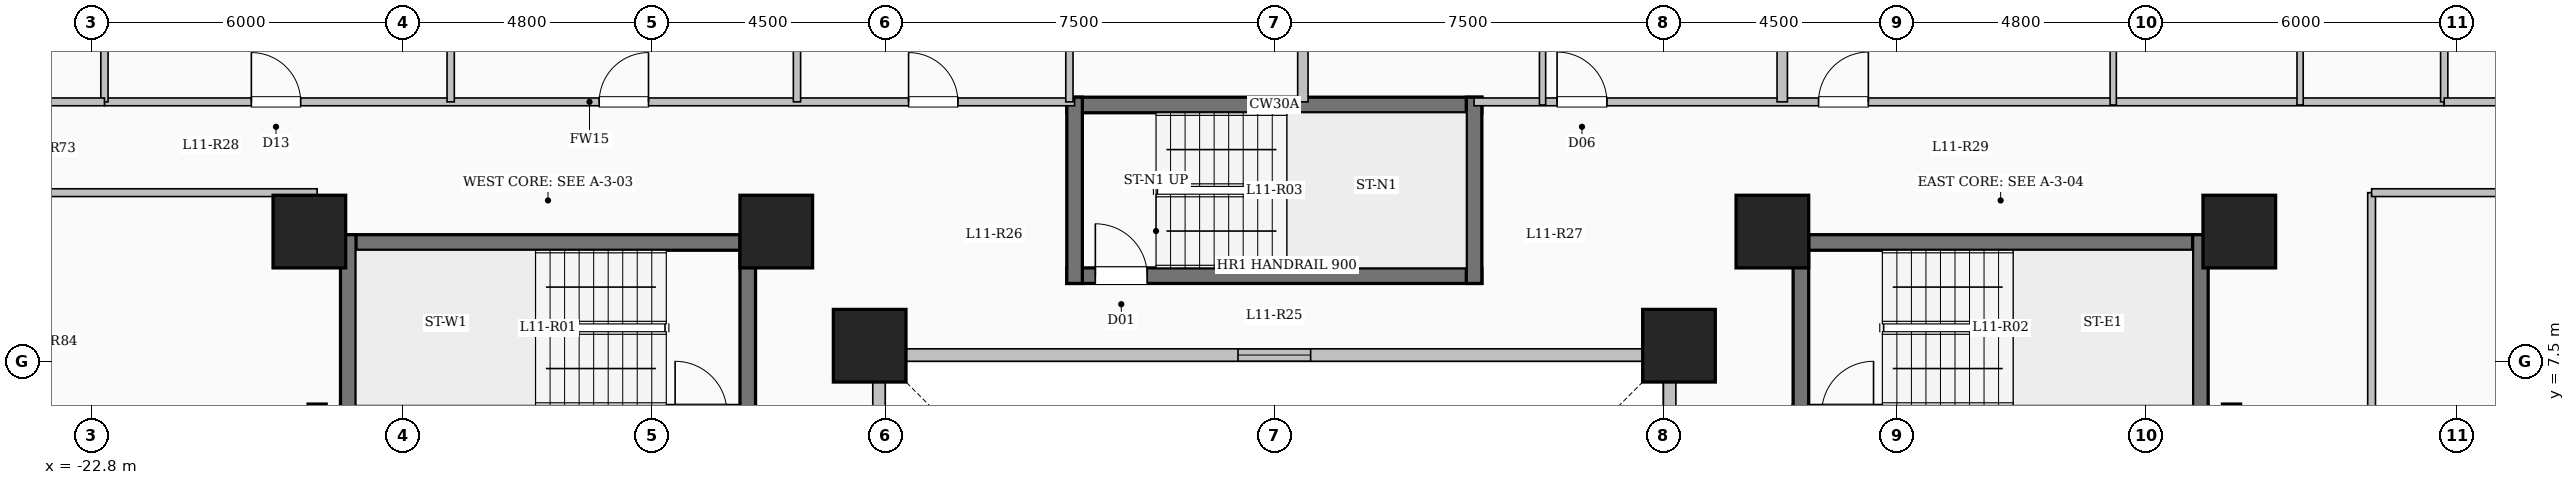
"""IFC4 building model, lengths in metres.
Left out: names, types, materials, properties, quantities, classifications, styles, units other than length and angle.
Written with IfcOpenShell. Run it as: python <this file> out.ifc"""

import sys

from ifc_helpers import new_model, si_unit, direction, frame, frame_2d, origin, origin_2d, place, context, subcontext, project, spatial, rectangle, extrude, element, fill, save


model = new_model("IFC4")
c1 = context("Model", 3, precision=1e-05, world=origin(), true_north=direction((0.0, 1.0)))
c2 = subcontext(c1, "Body", "Model", "MODEL_VIEW")
j1 = project(units=[si_unit("LENGTHUNIT", "METRE"), si_unit("PLANEANGLEUNIT", "RADIAN")], contexts=[c1])
p1 = place(None, origin())
s1 = spatial("IfcSite", under=j1, at=p1, CompositionType="ELEMENT")
p2 = place(p1, origin())
s2 = spatial("IfcBuilding", under=s1, at=p2, CompositionType="ELEMENT")
p3 = place(p2, frame((0.0, 0.0, 44.1)))
s3 = spatial("IfcBuildingStorey", under=s2, at=p3, CompositionType="ELEMENT", Elevation=44.1)
for number, where, z_axis, x_axis in (
    (1, (-7.8, 7.8, 0.0), (0.0, 0.0, 1.0), (1.0, 0.0, 0.0)),
    (2, (7.8, 7.8, 0.0), (0.0, 0.0, 1.0), (1.0, 0.0, 0.0)),
    (3, (-9.6, 10.0, 0.0), (0.0, 0.0, 1.0), (1.0, 0.0, 0.0)),
    (4, (9.6, 10.0, 0.0), (0.0, 0.0, 1.0), (1.0, 0.0, 0.0)),
    (5, (-18.6, 10.0, 0.0), (0.0, 0.0, 1.0), (1.0, 0.0, 0.0)),
    (6, (18.6, 10.0, 0.0), (0.0, 0.0, 1.0), (1.0, 0.0, 0.0)),
):
    element("IfcColumn", number, at=place(p3, frame(where, z_axis=z_axis, x_axis=x_axis)), inside=s3, PredefinedType="COLUMN", context=c2, shape_type="SweptSolid", body=[
        extrude(rectangle(XDim=1.4, YDim=1.4, at=origin_2d()), origin(), (0.0, 0.0, 1.0), 3.35),
    ])
p4 = place(p3, frame((7.62, -7.62, 0.0), z_axis=(0.0, 0.0, 1.0), x_axis=(0.0, 1.0, 0.0)))
e7 = element("IfcWall", 7, at=p4, inside=s3, PredefinedType="SOLIDWALL", context=c2, shape_type="SweptSolid", body=[
    extrude(rectangle(XDim=15.24, YDim=0.24, at=frame_2d((7.62, 0.0))), origin(), (0.0, 0.0, 1.0), 3.1),
])
p5 = place(p4, frame((6.92, 0.0, 0.95)))
e8 = element("IfcOpeningElement", 8, at=p5, cuts=e7, PredefinedType="OPENING", context=c2, shape_type="SweptSolid", body=[
    extrude(rectangle(XDim=1.4, YDim=1.5, at=frame_2d((0.7, 0.75))), frame((0.0, 0.13, 0.0), z_axis=(0.0, -1.0, 0.0), x_axis=(1.0, 0.0, 0.0)), (0.0, 0.0, 1.0), 0.26),
])
p6 = place(p3, frame((7.62, 7.62, 0.0), z_axis=(0.0, 0.0, 1.0), x_axis=(-1.0, 0.0, 0.0)))
e9 = element("IfcWall", 9, at=p6, inside=s3, PredefinedType="SOLIDWALL", context=c2, shape_type="SweptSolid", body=[
    extrude(rectangle(XDim=15.24, YDim=0.24, at=frame_2d((7.62, 0.0))), origin(), (0.0, 0.0, 1.0), 3.1),
])
p7 = place(p6, frame((6.92, 0.0, 0.95)))
e10 = element("IfcOpeningElement", 10, at=p7, cuts=e9, PredefinedType="OPENING", context=c2, shape_type="SweptSolid", body=[
    extrude(rectangle(XDim=1.4, YDim=1.5, at=frame_2d((0.7, 0.75))), frame((0.0, 0.13, 0.0), z_axis=(0.0, -1.0, 0.0), x_axis=(1.0, 0.0, 0.0)), (0.0, 0.0, 1.0), 0.26),
])
p8 = place(p3, frame((-7.62, 7.62, 0.0), z_axis=(0.0, 0.0, 1.0), x_axis=(0.0, -1.0, 0.0)))
e11 = element("IfcWall", 11, at=p8, inside=s3, PredefinedType="SOLIDWALL", context=c2, shape_type="SweptSolid", body=[
    extrude(rectangle(XDim=15.24, YDim=0.24, at=frame_2d((7.62, 0.0))), origin(), (0.0, 0.0, 1.0), 3.1),
])
p9 = place(p8, frame((6.92, 0.0, 0.95)))
e12 = element("IfcOpeningElement", 12, at=p9, cuts=e11, PredefinedType="OPENING", context=c2, shape_type="SweptSolid", body=[
    extrude(rectangle(XDim=1.4, YDim=1.5, at=frame_2d((0.7, 0.75))), frame((0.0, 0.13, 0.0), z_axis=(0.0, -1.0, 0.0), x_axis=(1.0, 0.0, 0.0)), (0.0, 0.0, 1.0), 0.26),
])
p10 = place(p3, frame((-18.0, 9.79, 0.0), z_axis=(0.0, 0.0, 1.0), x_axis=(1.0, 0.0, 0.0)))
e13 = element("IfcWall", 13, at=p10, inside=s3, PredefinedType="SHEAR", context=c2, shape_type="SweptSolid", body=[
    extrude(rectangle(XDim=8.0, YDim=0.3, at=frame_2d((4.0, 0.0))), origin(), (0.0, 0.0, 1.0), 3.35),
])
p11 = place(p3, frame((-18.0, 6.5, 0.0), z_axis=(0.0, 0.0, 1.0), x_axis=(1.0, 0.0, 0.0)))
e14 = element("IfcWall", 14, at=p11, inside=s3, PredefinedType="SHEAR", context=c2, shape_type="SweptSolid", body=[
    extrude(rectangle(XDim=8.0, YDim=0.3, at=frame_2d((4.0, 0.0))), origin(), (0.0, 0.0, 1.0), 3.35),
])
p12 = place(p11, frame((6.45, 0.0, 0.0)))
e15 = element("IfcOpeningElement", 15, at=p12, cuts=e14, PredefinedType="OPENING", context=c2, shape_type="SweptSolid", body=[
    extrude(rectangle(XDim=1.0, YDim=2.15, at=frame_2d((0.5, 1.075))), frame((0.0, 0.16, 0.0), z_axis=(0.0, -1.0, 0.0), x_axis=(1.0, 0.0, 0.0)), (0.0, 0.0, 1.0), 0.32),
])
for number, where, z_axis, x_axis in (
    (16, (-17.85, 6.35, 0.0), (0.0, 0.0, 1.0), (0.0, 1.0, 0.0)),
    (17, (-10.15, 6.35, 0.0), (0.0, 0.0, 1.0), (0.0, 1.0, 0.0)),
):
    element("IfcWall", number, at=place(p3, frame(where, z_axis=z_axis, x_axis=x_axis)), inside=s3, PredefinedType="SHEAR", context=c2, shape_type="SweptSolid", body=[
        extrude(rectangle(XDim=3.59, YDim=0.3, at=frame_2d((1.795, 0.0))), origin(), (0.0, 0.0, 1.0), 3.35),
    ])
p13 = place(p3, frame((10.0, 9.79, 0.0), z_axis=(0.0, 0.0, 1.0), x_axis=(1.0, 0.0, 0.0)))
e18 = element("IfcWall", 18, at=p13, inside=s3, PredefinedType="SHEAR", context=c2, shape_type="SweptSolid", body=[
    extrude(rectangle(XDim=8.0, YDim=0.3, at=frame_2d((4.0, 0.0))), origin(), (0.0, 0.0, 1.0), 3.35),
])
p14 = place(p3, frame((10.0, 6.5, 0.0), z_axis=(0.0, 0.0, 1.0), x_axis=(1.0, 0.0, 0.0)))
e19 = element("IfcWall", 19, at=p14, inside=s3, PredefinedType="SHEAR", context=c2, shape_type="SweptSolid", body=[
    extrude(rectangle(XDim=8.0, YDim=0.3, at=frame_2d((4.0, 0.0))), origin(), (0.0, 0.0, 1.0), 3.35),
])
p15 = place(p14, frame((0.55, 0.0, 0.0)))
e20 = element("IfcOpeningElement", 20, at=p15, cuts=e19, PredefinedType="OPENING", context=c2, shape_type="SweptSolid", body=[
    extrude(rectangle(XDim=1.0, YDim=2.15, at=frame_2d((0.5, 1.075))), frame((0.0, 0.16, 0.0), z_axis=(0.0, -1.0, 0.0), x_axis=(1.0, 0.0, 0.0)), (0.0, 0.0, 1.0), 0.32),
])
for number, where, z_axis, x_axis in (
    (21, (10.15, 6.35, 0.0), (0.0, 0.0, 1.0), (0.0, 1.0, 0.0)),
    (22, (17.85, 6.35, 0.0), (0.0, 0.0, 1.0), (0.0, 1.0, 0.0)),
):
    element("IfcWall", number, at=place(p3, frame(where, z_axis=z_axis, x_axis=x_axis)), inside=s3, PredefinedType="SHEAR", context=c2, shape_type="SweptSolid", body=[
        extrude(rectangle(XDim=3.59, YDim=0.3, at=frame_2d((1.795, 0.0))), origin(), (0.0, 0.0, 1.0), 3.35),
    ])
p16 = place(p3, frame((-4.0, 12.44, 0.0), z_axis=(0.0, 0.0, 1.0), x_axis=(1.0, 0.0, 0.0)))
e23 = element("IfcWall", 23, at=p16, inside=s3, PredefinedType="SHEAR", context=c2, shape_type="SweptSolid", body=[
    extrude(rectangle(XDim=8.0, YDim=0.3, at=frame_2d((4.0, 0.0))), origin(), (0.0, 0.0, 1.0), 3.35),
])
p17 = place(p3, frame((-4.0, 9.15, 0.0), z_axis=(0.0, 0.0, 1.0), x_axis=(1.0, 0.0, 0.0)))
e24 = element("IfcWall", 24, at=p17, inside=s3, PredefinedType="SHEAR", context=c2, shape_type="SweptSolid", body=[
    extrude(rectangle(XDim=8.0, YDim=0.3, at=frame_2d((4.0, 0.0))), origin(), (0.0, 0.0, 1.0), 3.35),
])
p18 = place(p17, frame((0.55, 0.0, 0.0)))
e25 = element("IfcOpeningElement", 25, at=p18, cuts=e24, PredefinedType="OPENING", context=c2, shape_type="SweptSolid", body=[
    extrude(rectangle(XDim=1.0, YDim=2.15, at=frame_2d((0.5, 1.075))), frame((0.0, 0.16, 0.0), z_axis=(0.0, -1.0, 0.0), x_axis=(1.0, 0.0, 0.0)), (0.0, 0.0, 1.0), 0.32),
])
for number, where, z_axis, x_axis in (
    (26, (-3.85, 9.0, 0.0), (0.0, 0.0, 1.0), (0.0, 1.0, 0.0)),
    (27, (3.85, 9.0, 0.0), (0.0, 0.0, 1.0), (0.0, 1.0, 0.0)),
):
    element("IfcWall", number, at=place(p3, frame(where, z_axis=z_axis, x_axis=x_axis)), inside=s3, PredefinedType="SHEAR", context=c2, shape_type="SweptSolid", body=[
        extrude(rectangle(XDim=3.59, YDim=0.3, at=frame_2d((1.795, 0.0))), origin(), (0.0, 0.0, 1.0), 3.35),
    ])
for number, where, z_axis, x_axis in (
    (28, (-18.45, -7.375, 0.0), (0.0, 0.0, 1.0), (0.0, 1.0, 0.0)),
    (29, (18.45, -7.375, 0.0), (0.0, 0.0, 1.0), (0.0, 1.0, 0.0)),
):
    element("IfcWall", number, at=place(p3, frame(where, z_axis=z_axis, x_axis=x_axis)), inside=s3, PredefinedType="SHEAR", context=c2, shape_type="SweptSolid", body=[
        extrude(rectangle(XDim=14.05, YDim=0.35, at=frame_2d((7.025, 0.0))), origin(), (0.0, 0.0, 1.0), 3.35),
    ])
p19 = place(p3, frame((-22.55, 12.5, 0.0), z_axis=(0.0, 0.0, 1.0), x_axis=(1.0, 0.0, 0.0)))
e30 = element("IfcWall", 30, at=p19, inside=s3, PredefinedType="PARTITIONING", context=c2, shape_type="SweptSolid", body=[
    extrude(rectangle(XDim=18.7, YDim=0.15, at=frame_2d((9.35, 0.0))), origin(), (0.0, 0.0, 1.0), 3.1),
])
p20 = place(p19, frame((2.832, 0.0, 0.0)))
e31 = element("IfcOpeningElement", 31, at=p20, cuts=e30, PredefinedType="OPENING", context=c2, shape_type="SweptSolid", body=[
    extrude(rectangle(XDim=0.95, YDim=2.15, at=frame_2d((0.475, 1.075))), frame((0.0, 0.085, 0.0), z_axis=(0.0, -1.0, 0.0), x_axis=(1.0, 0.0, 0.0)), (0.0, 0.0, 1.0), 0.17),
])
p21 = place(p19, frame((9.537, 0.0, 0.0)))
e32 = element("IfcOpeningElement", 32, at=p21, cuts=e30, PredefinedType="OPENING", context=c2, shape_type="SweptSolid", body=[
    extrude(rectangle(XDim=0.95, YDim=2.15, at=frame_2d((0.475, 1.075))), frame((0.0, 0.085, 0.0), z_axis=(0.0, -1.0, 0.0), x_axis=(1.0, 0.0, 0.0)), (0.0, 0.0, 1.0), 0.17),
])
p22 = place(p19, frame((15.5, 0.0, 0.0)))
e33 = element("IfcOpeningElement", 33, at=p22, cuts=e30, PredefinedType="OPENING", context=c2, shape_type="SweptSolid", body=[
    extrude(rectangle(XDim=0.95, YDim=2.15, at=frame_2d((0.475, 1.075))), frame((0.0, 0.085, 0.0), z_axis=(0.0, -1.0, 0.0), x_axis=(1.0, 0.0, 0.0)), (0.0, 0.0, 1.0), 0.17),
])
p23 = place(p3, frame((3.85, 12.5, 0.0), z_axis=(0.0, 0.0, 1.0), x_axis=(1.0, 0.0, 0.0)))
e34 = element("IfcWall", 34, at=p23, inside=s3, PredefinedType="PARTITIONING", context=c2, shape_type="SweptSolid", body=[
    extrude(rectangle(XDim=18.7, YDim=0.15, at=frame_2d((9.35, 0.0))), origin(), (0.0, 0.0, 1.0), 3.1),
])
p24 = place(p23, frame((1.6, 0.0, 0.0)))
e35 = element("IfcOpeningElement", 35, at=p24, cuts=e34, PredefinedType="OPENING", context=c2, shape_type="SweptSolid", body=[
    extrude(rectangle(XDim=0.96, YDim=2.15, at=frame_2d((0.48, 1.075))), frame((0.0, 0.085, 0.0), z_axis=(0.0, -1.0, 0.0), x_axis=(1.0, 0.0, 0.0)), (0.0, 0.0, 1.0), 0.17),
])
p25 = place(p23, frame((6.64, 0.0, 0.0)))
e36 = element("IfcOpeningElement", 36, at=p25, cuts=e34, PredefinedType="OPENING", context=c2, shape_type="SweptSolid", body=[
    extrude(rectangle(XDim=0.96, YDim=2.15, at=frame_2d((0.48, 1.075))), frame((0.0, 0.085, 0.0), z_axis=(0.0, -1.0, 0.0), x_axis=(1.0, 0.0, 0.0)), (0.0, 0.0, 1.0), 0.17),
])
p26 = place(p3, frame((21.15, -7.25, 0.0), z_axis=(0.0, 0.0, 1.0), x_axis=(0.0, 1.0, 0.0)))
e37 = element("IfcWall", 37, at=p26, inside=s3, PredefinedType="PARTITIONING", context=c2, shape_type="SweptSolid", body=[
    extrude(rectangle(XDim=18.0, YDim=0.15, at=frame_2d((9.0, 0.0))), origin(), (0.0, 0.0, 1.0), 2.585),
])
p27 = place(p3, frame((0.55, 12.5, 0.0), z_axis=(0.0, 0.0, 1.0), x_axis=(0.0, 1.0, 0.0)))
e38 = element("IfcWall", 38, at=p27, inside=s3, PredefinedType="SOLIDWALL", context=c2, shape_type="SweptSolid", body=[
    extrude(rectangle(XDim=12.58, YDim=0.2, at=frame_2d((6.29, 0.0))), origin(), (0.0, 0.0, 1.0), 3.1),
])
p28 = place(p3, frame((-3.95, 12.5, 0.0), z_axis=(0.0, 0.0, 1.0), x_axis=(0.0, 1.0, 0.0)))
e39 = element("IfcWall", 39, at=p28, inside=s3, PredefinedType="PARTITIONING", context=c2, shape_type="SweptSolid", body=[
    extrude(rectangle(XDim=11.05, YDim=0.14, at=frame_2d((5.525, 0.0))), origin(), (0.0, 0.0, 1.0), 3.1),
])
p29 = place(p28, frame((1.2, 0.0, 0.0)))
e40 = element("IfcOpeningElement", 40, at=p29, cuts=e39, PredefinedType="OPENING", context=c2, shape_type="SweptSolid", body=[
    extrude(rectangle(XDim=0.95, YDim=2.15, at=frame_2d((0.475, 1.075))), frame((0.0, 0.08, 0.0), z_axis=(0.0, -1.0, 0.0), x_axis=(1.0, 0.0, 0.0)), (0.0, 0.0, 1.0), 0.16),
])
for number, where, z_axis, x_axis in (
    (41, (-15.876, 12.5, 0.0), (0.0, 0.0, 1.0), (0.0, 1.0, 0.0)),
    (42, (-9.201, 12.5, 0.0), (0.0, 0.0, 1.0), (0.0, 1.0, 0.0)),
):
    element("IfcWall", number, at=place(p3, frame(where, z_axis=z_axis, x_axis=x_axis)), inside=s3, PredefinedType="PARTITIONING", context=c2, shape_type="SweptSolid", body=[
        extrude(rectangle(XDim=11.05, YDim=0.14, at=frame_2d((5.525, 0.0))), origin(), (0.0, 0.0, 1.0), 3.1),
    ])
p30 = place(p3, frame((9.79, 12.5, 0.0), z_axis=(0.0, 0.0, 1.0), x_axis=(0.0, 1.0, 0.0)))
e43 = element("IfcWall", 43, at=p30, inside=s3, PredefinedType="SOLIDWALL", context=c2, shape_type="SweptSolid", body=[
    extrude(rectangle(XDim=11.398, YDim=0.2, at=frame_2d((5.699, 0.0))), origin(), (0.0, 0.0, 1.0), 3.1),
])
p31 = place(p3, frame((5.17, 12.44, 0.0), z_axis=(0.0, 0.0, 1.0), x_axis=(0.0, 1.0, 0.0)))
e44 = element("IfcWall", 44, at=p31, inside=s3, PredefinedType="PARTITIONING", context=c2, shape_type="SweptSolid", body=[
    extrude(rectangle(XDim=3.21, YDim=0.12, at=frame_2d((1.605, 0.0))), origin(), (0.0, 0.0, 1.0), 3.1),
])
p32 = place(p31, frame((1.195, 0.0, 0.0)))
e45 = element("IfcOpeningElement", 45, at=p32, cuts=e44, PredefinedType="OPENING", context=c2, shape_type="SweptSolid", body=[
    extrude(rectangle(XDim=0.88, YDim=2.1, at=frame_2d((0.44, 1.05))), frame((0.0, 0.07, 0.0), z_axis=(0.0, -1.0, 0.0), x_axis=(1.0, 0.0, 0.0)), (0.0, 0.0, 1.0), 0.14),
])
p33 = place(p3, frame((16.17, 12.44, 0.0), z_axis=(0.0, 0.0, 1.0), x_axis=(0.0, 1.0, 0.0)))
e46 = element("IfcWall", 46, at=p33, inside=s3, PredefinedType="PARTITIONING", context=c2, shape_type="SweptSolid", body=[
    extrude(rectangle(XDim=11.16, YDim=0.12, at=frame_2d((5.58, 0.0))), origin(), (0.0, 0.0, 1.0), 3.1),
])
p34 = place(p33, frame((3.075, 0.0, 0.0)))
e47 = element("IfcOpeningElement", 47, at=p34, cuts=e46, PredefinedType="OPENING", context=c2, shape_type="SweptSolid", body=[
    extrude(rectangle(XDim=1.08, YDim=2.15, at=frame_2d((0.54, 1.075))), frame((0.0, 0.07, 0.0), z_axis=(0.0, -1.0, 0.0), x_axis=(1.0, 0.0, 0.0)), (0.0, 0.0, 1.0), 0.14),
])
p35 = place(p3, frame((19.772, 12.44, 0.0), z_axis=(0.0, 0.0, 1.0), x_axis=(0.0, 1.0, 0.0)))
e48 = element("IfcWall", 48, at=p35, inside=s3, PredefinedType="PARTITIONING", context=c2, shape_type="SweptSolid", body=[
    extrude(rectangle(XDim=2.79, YDim=0.12, at=frame_2d((1.395, 0.0))), origin(), (0.0, 0.0, 1.0), 3.1),
])
p36 = place(p3, frame((-28.68, 10.75, 0.0), z_axis=(0.0, 0.0, 1.0), x_axis=(1.0, 0.0, 0.0)))
e49 = element("IfcWall", 49, at=p36, inside=s3, PredefinedType="PARTITIONING", context=c2, shape_type="SweptSolid", body=[
    extrude(rectangle(XDim=10.23, YDim=0.15, at=frame_2d((5.115, 0.0))), origin(), (0.0, 0.0, 1.0), 3.1),
])
p37 = place(p3, frame((21.15, 10.75, 0.0), z_axis=(0.0, 0.0, 1.0), x_axis=(1.0, 0.0, 0.0)))
e50 = element("IfcWall", 50, at=p37, inside=s3, PredefinedType="PARTITIONING", context=c2, shape_type="SweptSolid", body=[
    extrude(rectangle(XDim=7.53, YDim=0.15, at=frame_2d((3.765, 0.0))), origin(), (0.0, 0.0, 1.0), 3.1),
])
for number, where, z_axis, x_axis in (
    (51, (-22.55, 12.5, 0.0), (0.0, 0.0, 1.0), (0.0, 1.0, 0.0)),
    (52, (22.55, 12.5, 0.0), (0.0, 0.0, 1.0), (0.0, 1.0, 0.0)),
):
    element("IfcWall", number, at=place(p3, frame(where, z_axis=z_axis, x_axis=x_axis)), inside=s3, PredefinedType="PARTITIONING", context=c2, shape_type="SweptSolid", body=[
        extrude(rectangle(XDim=6.55, YDim=0.14, at=frame_2d((3.275, 0.0))), origin(), (0.0, 0.0, 1.0), 3.1),
    ])
p38 = place(p3, frame((-28.68, 12.5, 0.0), z_axis=(0.0, 0.0, 1.0), x_axis=(1.0, 0.0, 0.0)))
e53 = element("IfcWall", 53, at=p38, inside=s3, PredefinedType="PARTITIONING", context=c2, shape_type="SweptSolid", body=[
    extrude(rectangle(XDim=6.13, YDim=0.15, at=frame_2d((3.065, 0.0))), origin(), (0.0, 0.0, 1.0), 3.1),
])
p39 = place(p38, frame((2.59, 0.0, 0.0)))
e54 = element("IfcOpeningElement", 54, at=p39, cuts=e53, PredefinedType="OPENING", context=c2, shape_type="SweptSolid", body=[
    extrude(rectangle(XDim=0.95, YDim=2.15, at=frame_2d((0.475, 1.075))), frame((0.0, 0.085, 0.0), z_axis=(0.0, -1.0, 0.0), x_axis=(1.0, 0.0, 0.0)), (0.0, 0.0, 1.0), 0.17),
])
p40 = place(p3, frame((22.55, 12.5, 0.0), z_axis=(0.0, 0.0, 1.0), x_axis=(1.0, 0.0, 0.0)))
e55 = element("IfcWall", 55, at=p40, inside=s3, PredefinedType="PARTITIONING", context=c2, shape_type="SweptSolid", body=[
    extrude(rectangle(XDim=6.13, YDim=0.15, at=frame_2d((3.065, 0.0))), origin(), (0.0, 0.0, 1.0), 3.1),
])
p41 = place(p40, frame((2.59, 0.0, 0.0)))
e56 = element("IfcOpeningElement", 56, at=p41, cuts=e55, PredefinedType="OPENING", context=c2, shape_type="SweptSolid", body=[
    extrude(rectangle(XDim=0.95, YDim=2.15, at=frame_2d((0.475, 1.075))), frame((0.0, 0.085, 0.0), z_axis=(0.0, -1.0, 0.0), x_axis=(1.0, 0.0, 0.0)), (0.0, 0.0, 1.0), 0.17),
])
p42 = place(p7, origin())
e57 = element("IfcWindow", 57, at=p42, inside=s3, PartitioningType="SINGLE_PANEL", PredefinedType="WINDOW", context=c2, shape_type="SweptSolid", body=[
    extrude(rectangle(XDim=1.4, YDim=1.5, at=frame_2d((0.7, 0.75))), frame((0.0, 0.03, 0.0), z_axis=(0.0, -1.0, 0.0), x_axis=(1.0, 0.0, 0.0)), (0.0, 0.0, 1.0), 0.06),
])
fill(e10, e57)
p43 = place(p18, origin())
e58 = element("IfcDoor", 58, at=p43, inside=s3, OperationType="SINGLE_SWING_LEFT", PredefinedType="DOOR", context=c2, shape_type="SweptSolid", body=[
    extrude(rectangle(XDim=1.0, YDim=2.15, at=frame_2d((0.5, 1.075))), frame((0.0, 0.025, 0.0), z_axis=(0.0, -1.0, 0.0), x_axis=(1.0, 0.0, 0.0)), (0.0, 0.0, 1.0), 0.05),
])
fill(e25, e58)
p44 = place(p20, origin())
e59 = element("IfcDoor", 59, at=p44, inside=s3, OperationType="SINGLE_SWING_LEFT", PredefinedType="DOOR", context=c2, shape_type="SweptSolid", body=[
    extrude(rectangle(XDim=0.95, YDim=2.15, at=frame_2d((0.475, 1.075))), frame((0.0, 0.025, 0.0), z_axis=(0.0, -1.0, 0.0), x_axis=(1.0, 0.0, 0.0)), (0.0, 0.0, 1.0), 0.05),
])
fill(e31, e59)
p45 = place(p21, origin())
e60 = element("IfcDoor", 60, at=p45, inside=s3, OperationType="SINGLE_SWING_RIGHT", PredefinedType="DOOR", context=c2, shape_type="SweptSolid", body=[
    extrude(rectangle(XDim=0.95, YDim=2.15, at=frame_2d((0.475, 1.075))), frame((0.0, 0.025, 0.0), z_axis=(0.0, -1.0, 0.0), x_axis=(1.0, 0.0, 0.0)), (0.0, 0.0, 1.0), 0.05),
])
fill(e32, e60)
p46 = place(p22, origin())
e61 = element("IfcDoor", 61, at=p46, inside=s3, OperationType="SINGLE_SWING_LEFT", PredefinedType="DOOR", context=c2, shape_type="SweptSolid", body=[
    extrude(rectangle(XDim=0.95, YDim=2.15, at=frame_2d((0.475, 1.075))), frame((0.0, 0.025, 0.0), z_axis=(0.0, -1.0, 0.0), x_axis=(1.0, 0.0, 0.0)), (0.0, 0.0, 1.0), 0.05),
])
fill(e33, e61)
p47 = place(p24, origin())
e62 = element("IfcDoor", 62, at=p47, inside=s3, OperationType="SINGLE_SWING_LEFT", PredefinedType="DOOR", context=c2, shape_type="SweptSolid", body=[
    extrude(rectangle(XDim=0.96, YDim=2.15, at=frame_2d((0.48, 1.075))), frame((0.0, 0.025, 0.0), z_axis=(0.0, -1.0, 0.0), x_axis=(1.0, 0.0, 0.0)), (0.0, 0.0, 1.0), 0.05),
])
fill(e35, e62)
p48 = place(p25, origin())
e63 = element("IfcDoor", 63, at=p48, inside=s3, OperationType="SINGLE_SWING_RIGHT", PredefinedType="DOOR", context=c2, shape_type="SweptSolid", body=[
    extrude(rectangle(XDim=0.96, YDim=2.15, at=frame_2d((0.48, 1.075))), frame((0.0, 0.025, 0.0), z_axis=(0.0, -1.0, 0.0), x_axis=(1.0, 0.0, 0.0)), (0.0, 0.0, 1.0), 0.05),
])
fill(e36, e63)
save(model, sys.argv[1])
